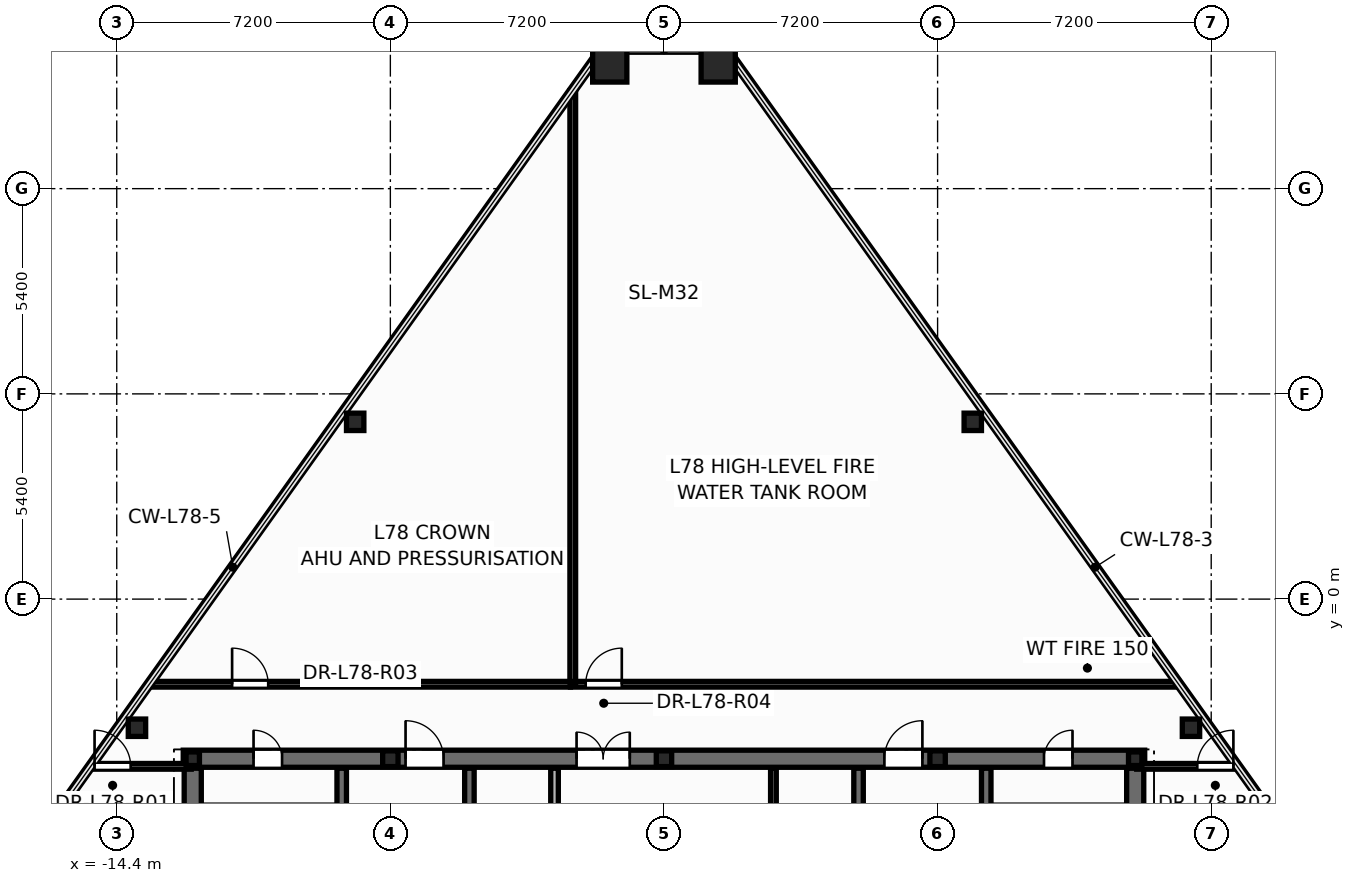
"""IFC4 building model, lengths in metres.
Left out: names, types, materials, properties, quantities, classifications, styles, units other than length and angle.
Written with IfcOpenShell. Run it as: python <this file> out.ifc"""

import sys

from ifc_helpers import new_model, si_unit, direction, frame, frame_2d, origin, origin_2d, place, context, subcontext, project, spatial, rectangle, hollow_rectangle, hollow_circle, i_section, extrude, element, fill, save


model = new_model("IFC4")
c1 = context("Model", 3, precision=1e-05, world=origin(), true_north=direction((0.0, 1.0)))
c2 = subcontext(c1, "Body", "Model", "MODEL_VIEW")
j1 = project(units=[si_unit("LENGTHUNIT", "METRE"), si_unit("PLANEANGLEUNIT", "RADIAN")], contexts=[c1])
p1 = place(None, origin())
s1 = spatial("IfcSite", under=j1, at=p1, CompositionType="ELEMENT")
p2 = place(p1, origin())
s2 = spatial("IfcBuilding", under=s1, at=p2, CompositionType="ELEMENT")
p3 = place(p2, frame((0.0, 0.0, 297.6)))
s3 = spatial("IfcBuildingStorey", under=s2, at=p3, CompositionType="ELEMENT", Elevation=297.6)
for number, where, z_axis, x_axis in (
    (1, (1.427, 14.055, 0.0), (0.0, 0.0, 1.0), (1.0, 0.0, 0.0)),
    (2, (-1.427, 14.055, 0.0), (0.0, 0.0, 1.0), (1.0, 0.0, 0.0)),
):
    element("IfcColumn", number, at=place(p3, frame(where, z_axis=z_axis, x_axis=x_axis)), inside=s3, PredefinedType="COLUMN", context=c2, shape_type="SweptSolid", body=[
        extrude(hollow_rectangle(XDim=0.9, YDim=0.9, WallThickness=0.04, at=origin_2d()), origin(), (0.0, 0.0, 1.0), 4.2),
    ])
for number, where, z_axis, x_axis in (
    (3, (13.868, -3.385, 0.0), (0.0, 0.0, 1.0), (1.0, 0.0, 0.0)),
    (4, (8.126, 4.664, 0.0), (0.0, 0.0, 1.0), (1.0, 0.0, 0.0)),
    (5, (-8.126, 4.664, 0.0), (0.0, 0.0, 1.0), (1.0, 0.0, 0.0)),
    (6, (-13.868, -3.385, 0.0), (0.0, 0.0, 1.0), (1.0, 0.0, 0.0)),
):
    element("IfcColumn", number, at=place(p3, frame(where, z_axis=z_axis, x_axis=x_axis)), inside=s3, PredefinedType="COLUMN", context=c2, shape_type="SweptSolid", body=[
        extrude(hollow_circle(Radius=0.229, WallThickness=0.016, at=origin_2d()), origin(), (0.0, 0.0, 1.0), 4.2),
    ])
for number, where, z_axis, x_axis in (
    (7, (12.4, -4.2, 0.0), (0.0, 0.0, 1.0), (1.0, 0.0, 0.0)),
    (8, (-12.4, -4.2, 0.0), (0.0, 0.0, 1.0), (1.0, 0.0, 0.0)),
):
    element("IfcColumn", number, at=place(p3, frame(where, z_axis=z_axis, x_axis=x_axis)), inside=s3, PredefinedType="COLUMN", context=c2, shape_type="SweptSolid", body=[
        extrude(i_section(OverallWidth=0.352, OverallDepth=0.359, WebThickness=0.018, FlangeThickness=0.026, at=origin_2d()), origin(), (0.0, 0.0, 1.0), 4.2),
    ])
for number, where, z_axis, x_axis in (
    (9, (-7.2, -4.2, 0.0), (0.0, 0.0, 1.0), (1.0, 0.0, 0.0)),
    (10, (0.0, -4.2, 0.0), (0.0, 0.0, 1.0), (1.0, 0.0, 0.0)),
    (11, (7.2, -4.2, 0.0), (0.0, 0.0, 1.0), (1.0, 0.0, 0.0)),
):
    element("IfcColumn", number, at=place(p3, frame(where, z_axis=z_axis, x_axis=x_axis)), inside=s3, PredefinedType="PILASTER", context=c2, shape_type="SweptSolid", body=[
        extrude(i_section(OverallWidth=0.405, OverallDepth=0.414, WebThickness=0.022, FlangeThickness=0.032, at=origin_2d()), origin(), (0.0, 0.0, 1.0), 4.2),
    ])
p4 = place(p3, frame((2.88, -5.6, 0.0), z_axis=(0.0, 0.0, 1.0), x_axis=(0.0, 1.0, 0.0)))
e12 = element("IfcWall", 12, at=p4, inside=s3, PredefinedType="PARTITIONING", context=c2, shape_type="SweptSolid", body=[
    extrude(rectangle(XDim=1.15, YDim=0.15, at=frame_2d((0.575, 0.0))), origin(), (0.0, 0.0, 1.0), 3.88),
])
p5 = place(p3, frame((-12.65, -4.2, 0.0), z_axis=(0.0, 0.0, 1.0), x_axis=(1.0, 0.0, 0.0)))
e13 = element("IfcWall", 13, at=p5, inside=s3, PredefinedType="SHEAR", context=c2, shape_type="SweptSolid", body=[
    extrude(rectangle(XDim=25.3, YDim=0.45, at=frame_2d((12.65, 0.0))), origin(), (0.0, 0.0, 1.0), 4.2),
])
p6 = place(p5, frame((1.85, 0.0, 0.0)))
e14 = element("IfcOpeningElement", 14, at=p6, cuts=e13, PredefinedType="OPENING", context=c2, shape_type="SweptSolid", body=[
    extrude(rectangle(XDim=0.756, YDim=2.054, at=frame_2d((0.375, 1.027))), frame((0.0, 0.235, 0.0), z_axis=(0.0, -1.0, 0.0), x_axis=(1.0, 0.0, 0.0)), (0.0, 0.0, 1.0), 0.47),
])
p7 = place(p5, frame((22.65, 0.0, 0.0)))
e15 = element("IfcOpeningElement", 15, at=p7, cuts=e13, PredefinedType="OPENING", context=c2, shape_type="SweptSolid", body=[
    extrude(rectangle(XDim=0.756, YDim=2.054, at=frame_2d((0.375, 1.027))), frame((0.0, 0.235, 0.0), z_axis=(0.0, -1.0, 0.0), x_axis=(1.0, 0.0, 0.0)), (0.0, 0.0, 1.0), 0.47),
])
p8 = place(p5, frame((5.85, 0.0, 0.0)))
e16 = element("IfcOpeningElement", 16, at=p8, cuts=e13, PredefinedType="OPENING", context=c2, shape_type="SweptSolid", body=[
    extrude(rectangle(XDim=1.006, YDim=2.104, at=frame_2d((0.5, 1.052))), frame((0.0, 0.235, 0.0), z_axis=(0.0, -1.0, 0.0), x_axis=(1.0, 0.0, 0.0)), (0.0, 0.0, 1.0), 0.47),
])
p9 = place(p5, frame((10.35, 0.0, 0.0)))
e17 = element("IfcOpeningElement", 17, at=p9, cuts=e13, PredefinedType="OPENING", context=c2, shape_type="SweptSolid", body=[
    extrude(rectangle(XDim=1.406, YDim=2.154, at=frame_2d((0.7, 1.077))), frame((0.0, 0.235, 0.0), z_axis=(0.0, -1.0, 0.0), x_axis=(1.0, 0.0, 0.0)), (0.0, 0.0, 1.0), 0.47),
])
p10 = place(p5, frame((18.45, 0.0, 0.0)))
e18 = element("IfcOpeningElement", 18, at=p10, cuts=e13, PredefinedType="OPENING", context=c2, shape_type="SweptSolid", body=[
    extrude(rectangle(XDim=1.006, YDim=2.104, at=frame_2d((0.5, 1.052))), frame((0.0, 0.235, 0.0), z_axis=(0.0, -1.0, 0.0), x_axis=(1.0, 0.0, 0.0)), (0.0, 0.0, 1.0), 0.47),
])
p11 = place(p3, frame((-8.48, -13.85, 0.0), z_axis=(0.0, 0.0, 1.0), x_axis=(0.0, 1.0, 0.0)))
e19 = element("IfcWall", 19, at=p11, inside=s3, PredefinedType="SHEAR", context=c2, shape_type="SweptSolid", body=[
    extrude(rectangle(XDim=9.4, YDim=0.25, at=frame_2d((4.7, 0.0))), origin(), (0.0, 0.0, 1.0), 4.2),
])
p12 = place(p11, frame((6.95, 0.0, 0.0)))
e20 = element("IfcOpeningElement", 20, at=p12, cuts=e19, PredefinedType="OPENING", context=c2, shape_type="SweptSolid", body=[
    extrude(rectangle(XDim=1.006, YDim=2.104, at=frame_2d((0.5, 1.052))), frame((0.0, 0.135, 0.0), z_axis=(0.0, -1.0, 0.0), x_axis=(1.0, 0.0, 0.0)), (0.0, 0.0, 1.0), 0.27),
])
p13 = place(p3, frame((8.48, -13.85, 0.0), z_axis=(0.0, 0.0, 1.0), x_axis=(0.0, 1.0, 0.0)))
e21 = element("IfcWall", 21, at=p13, inside=s3, PredefinedType="SHEAR", context=c2, shape_type="SweptSolid", body=[
    extrude(rectangle(XDim=9.4, YDim=0.25, at=frame_2d((4.7, 0.0))), origin(), (0.0, 0.0, 1.0), 4.2),
])
p14 = place(p13, frame((6.95, 0.0, 0.0)))
e22 = element("IfcOpeningElement", 22, at=p14, cuts=e21, PredefinedType="OPENING", context=c2, shape_type="SweptSolid", body=[
    extrude(rectangle(XDim=1.006, YDim=2.104, at=frame_2d((0.5, 1.052))), frame((0.0, 0.135, 0.0), z_axis=(0.0, -1.0, 0.0), x_axis=(1.0, 0.0, 0.0)), (0.0, 0.0, 1.0), 0.27),
])
for number, where, z_axis, x_axis in (
    (23, (-5.12, -13.85, 0.0), (0.0, 0.0, 1.0), (0.0, 1.0, 0.0)),
    (24, (5.12, -13.85, 0.0), (0.0, 0.0, 1.0), (0.0, 1.0, 0.0)),
):
    element("IfcWall", number, at=place(p3, frame(where, z_axis=z_axis, x_axis=x_axis)), inside=s3, PredefinedType="SHEAR", context=c2, shape_type="SweptSolid", body=[
        extrude(rectangle(XDim=9.4, YDim=0.25, at=frame_2d((4.7, 0.0))), origin(), (0.0, 0.0, 1.0), 4.2),
    ])
for number, where, z_axis, x_axis in (
    (25, (-12.4, -13.85, 0.0), (0.0, 0.0, 1.0), (0.0, 1.0, 0.0)),
    (26, (12.4, -13.85, 0.0), (0.0, 0.0, 1.0), (0.0, 1.0, 0.0)),
):
    element("IfcWall", number, at=place(p3, frame(where, z_axis=z_axis, x_axis=x_axis)), inside=s3, PredefinedType="SHEAR", context=c2, shape_type="SweptSolid", body=[
        extrude(rectangle(XDim=9.4, YDim=0.45, at=frame_2d((4.7, 0.0))), origin(), (0.0, 0.0, 1.0), 4.2),
    ])
p15 = place(p3, frame((-2.88, -9.45, 0.0), z_axis=(0.0, 0.0, 1.0), x_axis=(0.0, 1.0, 0.0)))
e27 = element("IfcWall", 27, at=p15, inside=s3, PredefinedType="SOLIDWALL", context=c2, shape_type="SweptSolid", body=[
    extrude(rectangle(XDim=5.0, YDim=0.2, at=frame_2d((2.5, 0.0))), origin(), (0.0, 0.0, 1.0), 3.88),
])
p16 = place(p15, frame((2.05, 0.0, 0.0)))
e28 = element("IfcOpeningElement", 28, at=p16, cuts=e27, PredefinedType="OPENING", context=c2, shape_type="SweptSolid", body=[
    extrude(rectangle(XDim=0.926, YDim=2.104, at=frame_2d((0.46, 1.052))), frame((0.0, 0.11, 0.0), z_axis=(0.0, -1.0, 0.0), x_axis=(1.0, 0.0, 0.0)), (0.0, 0.0, 1.0), 0.22),
])
p17 = place(p3, frame((-2.46, -2.24, 0.0), z_axis=(0.0, 0.0, 1.0), x_axis=(1.0, 0.0, 0.0)))
e29 = element("IfcWall", 29, at=p17, inside=s3, PredefinedType="PARTITIONING", context=c2, shape_type="SweptSolid", body=[
    extrude(rectangle(XDim=16.003, YDim=0.15, at=frame_2d((8.001, 0.0))), origin(), (0.0, 0.0, 1.0), 2.855),
])
p18 = place(p17, frame((0.4, 0.0, 0.0)))
e30 = element("IfcOpeningElement", 30, at=p18, cuts=e29, PredefinedType="OPENING", context=c2, shape_type="SweptSolid", body=[
    extrude(rectangle(XDim=0.956, YDim=2.104, at=frame_2d((0.475, 1.052))), frame((0.0, 0.085, 0.0), z_axis=(0.0, -1.0, 0.0), x_axis=(1.0, 0.0, 0.0)), (0.0, 0.0, 1.0), 0.17),
])
p19 = place(p3, frame((-2.4, -2.24, 0.0), z_axis=(0.0, 0.0, 1.0), x_axis=(0.0, 1.0, 0.0)))
e31 = element("IfcWall", 31, at=p19, inside=s3, PredefinedType="PARTITIONING", context=c2, shape_type="SweptSolid", body=[
    extrude(rectangle(XDim=15.619, YDim=0.15, at=frame_2d((7.81, 0.0))), origin(), (0.0, 0.0, 1.0), 2.855),
])
p20 = place(p3, frame((-13.543, -2.24, 0.0), z_axis=(0.0, 0.0, 1.0), x_axis=(1.0, 0.0, 0.0)))
e32 = element("IfcWall", 32, at=p20, inside=s3, PredefinedType="PARTITIONING", context=c2, shape_type="SweptSolid", body=[
    extrude(rectangle(XDim=11.081, YDim=0.15, at=frame_2d((5.541, 0.0))), origin(), (0.0, 0.0, 1.0), 2.855),
])
p21 = place(p20, frame((2.178, 0.0, 0.0)))
e33 = element("IfcOpeningElement", 33, at=p21, cuts=e32, PredefinedType="OPENING", context=c2, shape_type="SweptSolid", body=[
    extrude(rectangle(XDim=0.956, YDim=2.104, at=frame_2d((0.475, 1.052))), frame((0.0, 0.085, 0.0), z_axis=(0.0, -1.0, 0.0), x_axis=(1.0, 0.0, 0.0)), (0.0, 0.0, 1.0), 0.17),
])
p22 = place(p3, frame((-15.083, -4.4, 0.0), z_axis=(0.0, 0.0, 1.0), x_axis=(1.0, 0.0, 0.0)))
e34 = element("IfcWall", 34, at=p22, inside=s3, PredefinedType="PARTITIONING", context=c2, shape_type="SweptSolid", body=[
    extrude(rectangle(XDim=2.644, YDim=0.15, at=frame_2d((1.322, 0.0))), origin(), (0.0, 0.0, 1.0), 2.855),
])
p23 = place(p22, frame((0.1, 0.0, 0.0)))
e35 = element("IfcOpeningElement", 35, at=p23, cuts=e34, PredefinedType="OPENING", context=c2, shape_type="SweptSolid", body=[
    extrude(rectangle(XDim=0.956, YDim=2.104, at=frame_2d((0.475, 1.052))), frame((0.0, 0.085, 0.0), z_axis=(0.0, -1.0, 0.0), x_axis=(1.0, 0.0, 0.0)), (0.0, 0.0, 1.0), 0.17),
])
p24 = place(p3, frame((12.44, -4.4, 0.0), z_axis=(0.0, 0.0, 1.0), x_axis=(1.0, 0.0, 0.0)))
e36 = element("IfcWall", 36, at=p24, inside=s3, PredefinedType="PARTITIONING", context=c2, shape_type="SweptSolid", body=[
    extrude(rectangle(XDim=2.644, YDim=0.15, at=frame_2d((1.322, 0.0))), origin(), (0.0, 0.0, 1.0), 2.855),
])
p25 = place(p24, frame((1.594, 0.0, 0.0)))
e37 = element("IfcOpeningElement", 37, at=p25, cuts=e36, PredefinedType="OPENING", context=c2, shape_type="SweptSolid", body=[
    extrude(rectangle(XDim=0.956, YDim=2.104, at=frame_2d((0.475, 1.052))), frame((0.0, 0.085, 0.0), z_axis=(0.0, -1.0, 0.0), x_axis=(1.0, 0.0, 0.0)), (0.0, 0.0, 1.0), 0.17),
])
p26 = place(p6, origin())
e38 = element("IfcDoor", 38, at=p26, inside=s3, OperationType="SINGLE_SWING_LEFT", PredefinedType="DOOR", context=c2, shape_type="SweptSolid", body=[
    extrude(rectangle(XDim=0.75, YDim=2.05, at=frame_2d((0.375, 1.025))), frame((0.0, 0.025, 0.0), z_axis=(0.0, -1.0, 0.0), x_axis=(1.0, 0.0, 0.0)), (0.0, 0.0, 1.0), 0.05),
])
fill(e14, e38)
p27 = place(p7, origin())
e39 = element("IfcDoor", 39, at=p27, inside=s3, OperationType="SINGLE_SWING_RIGHT", PredefinedType="DOOR", context=c2, shape_type="SweptSolid", body=[
    extrude(rectangle(XDim=0.75, YDim=2.05, at=frame_2d((0.375, 1.025))), frame((0.0, 0.025, 0.0), z_axis=(0.0, -1.0, 0.0), x_axis=(1.0, 0.0, 0.0)), (0.0, 0.0, 1.0), 0.05),
])
fill(e15, e39)
p28 = place(p8, origin())
e40 = element("IfcDoor", 40, at=p28, inside=s3, OperationType="SINGLE_SWING_LEFT", PredefinedType="DOOR", context=c2, shape_type="SweptSolid", body=[
    extrude(rectangle(XDim=1.0, YDim=2.1, at=frame_2d((0.5, 1.05))), frame((0.0, 0.025, 0.0), z_axis=(0.0, -1.0, 0.0), x_axis=(1.0, 0.0, 0.0)), (0.0, 0.0, 1.0), 0.05),
])
fill(e16, e40)
p29 = place(p9, origin())
e41 = element("IfcDoor", 41, at=p29, inside=s3, OperationType="DOUBLE_DOOR_SINGLE_SWING", PredefinedType="DOOR", context=c2, shape_type="SweptSolid", body=[
    extrude(rectangle(XDim=1.4, YDim=2.15, at=frame_2d((0.7, 1.075))), frame((0.0, 0.025, 0.0), z_axis=(0.0, -1.0, 0.0), x_axis=(1.0, 0.0, 0.0)), (0.0, 0.0, 1.0), 0.05),
])
fill(e17, e41)
p30 = place(p10, origin())
e42 = element("IfcDoor", 42, at=p30, inside=s3, OperationType="SINGLE_SWING_RIGHT", PredefinedType="DOOR", context=c2, shape_type="SweptSolid", body=[
    extrude(rectangle(XDim=1.0, YDim=2.1, at=frame_2d((0.5, 1.05))), frame((0.0, 0.025, 0.0), z_axis=(0.0, -1.0, 0.0), x_axis=(1.0, 0.0, 0.0)), (0.0, 0.0, 1.0), 0.05),
])
fill(e18, e42)
p31 = place(p23, origin())
e43 = element("IfcDoor", 43, at=p31, inside=s3, OperationType="SINGLE_SWING_LEFT", PredefinedType="DOOR", context=c2, shape_type="SweptSolid", body=[
    extrude(rectangle(XDim=0.95, YDim=2.1, at=frame_2d((0.475, 1.05))), frame((0.0, 0.025, 0.0), z_axis=(0.0, -1.0, 0.0), x_axis=(1.0, 0.0, 0.0)), (0.0, 0.0, 1.0), 0.05),
])
fill(e35, e43)
p32 = place(p25, origin())
e44 = element("IfcDoor", 44, at=p32, inside=s3, OperationType="SINGLE_SWING_RIGHT", PredefinedType="DOOR", context=c2, shape_type="SweptSolid", body=[
    extrude(rectangle(XDim=0.95, YDim=2.1, at=frame_2d((0.475, 1.05))), frame((0.0, 0.025, 0.0), z_axis=(0.0, -1.0, 0.0), x_axis=(1.0, 0.0, 0.0)), (0.0, 0.0, 1.0), 0.05),
])
fill(e37, e44)
p33 = place(p21, origin())
e45 = element("IfcDoor", 45, at=p33, inside=s3, OperationType="SINGLE_SWING_LEFT", PredefinedType="DOOR", context=c2, shape_type="SweptSolid", body=[
    extrude(rectangle(XDim=0.95, YDim=2.1, at=frame_2d((0.475, 1.05))), frame((0.0, 0.025, 0.0), z_axis=(0.0, -1.0, 0.0), x_axis=(1.0, 0.0, 0.0)), (0.0, 0.0, 1.0), 0.05),
])
fill(e33, e45)
p34 = place(p18, origin())
e46 = element("IfcDoor", 46, at=p34, inside=s3, OperationType="SINGLE_SWING_RIGHT", PredefinedType="DOOR", context=c2, shape_type="SweptSolid", body=[
    extrude(rectangle(XDim=0.95, YDim=2.1, at=frame_2d((0.475, 1.05))), frame((0.0, 0.025, 0.0), z_axis=(0.0, -1.0, 0.0), x_axis=(1.0, 0.0, 0.0)), (0.0, 0.0, 1.0), 0.05),
])
fill(e30, e46)
save(model, sys.argv[1])
